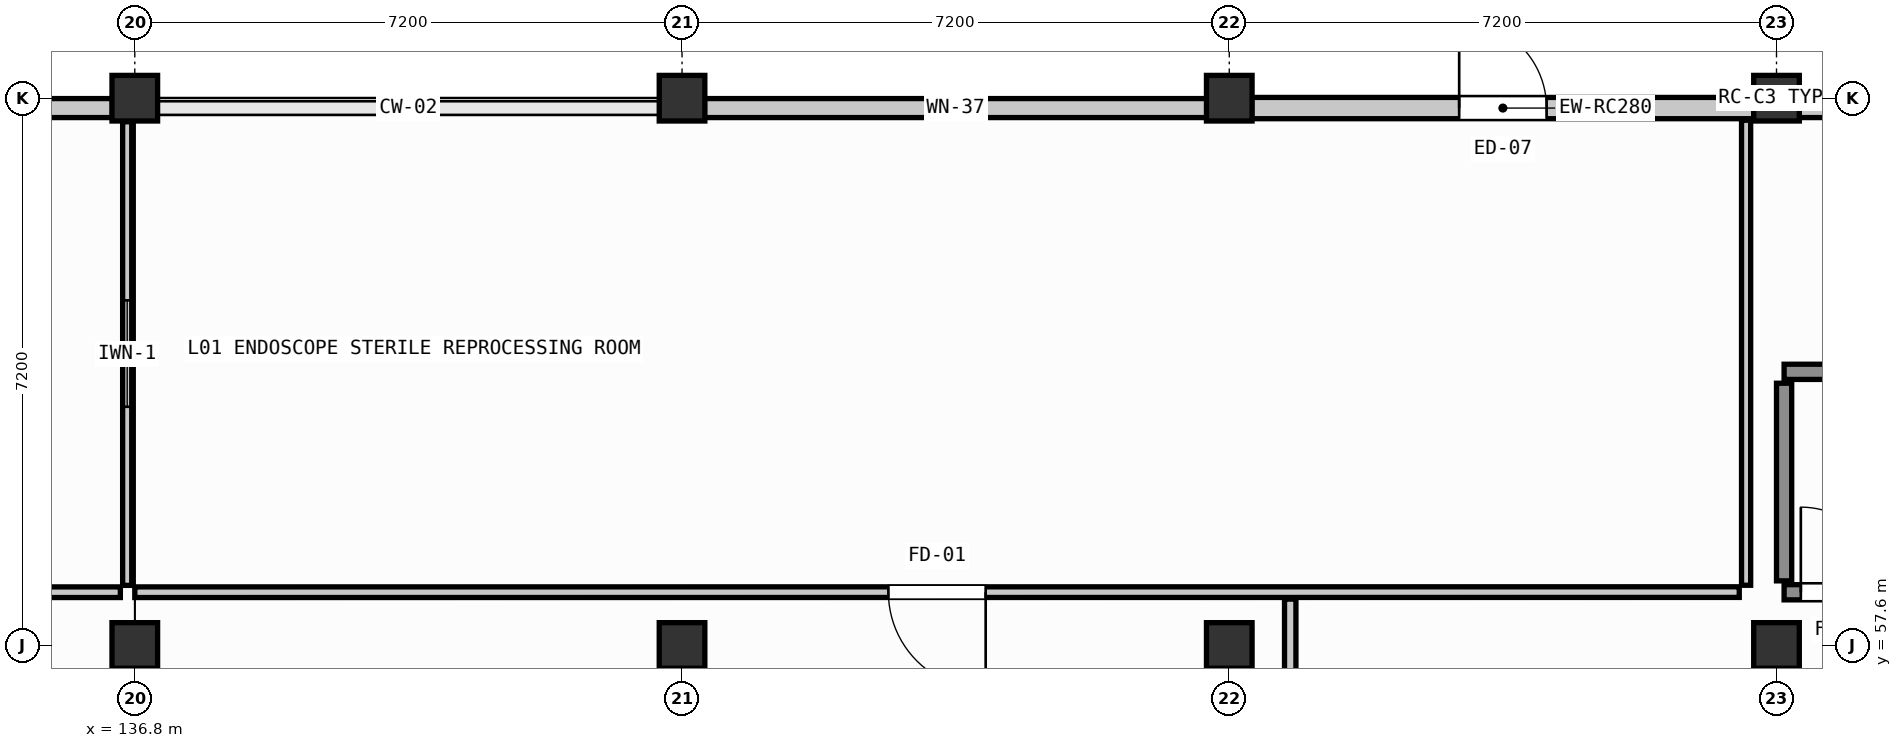
"""IFC4 building model, lengths in metres.
Left out: names, types, materials, properties, quantities, classifications, styles, units other than length and angle.
Written with IfcOpenShell. Run it as: python <this file> out.ifc"""

import sys

from ifc_helpers import new_model, si_unit, direction, frame, frame_2d, origin, origin_2d, place, context, subcontext, project, spatial, rectangle, extrude, element, fill, save


model = new_model("IFC4")
c1 = context("Model", 3, precision=1e-05, world=origin(), true_north=direction((0.0, 1.0)))
c2 = subcontext(c1, "Body", "Model", "MODEL_VIEW")
j1 = project(units=[si_unit("LENGTHUNIT", "METRE"), si_unit("PLANEANGLEUNIT", "RADIAN")], contexts=[c1])
p1 = place(None, origin())
s1 = spatial("IfcSite", under=j1, at=p1, CompositionType="ELEMENT")
p2 = place(p1, origin())
s2 = spatial("IfcBuilding", under=s1, at=p2, CompositionType="ELEMENT")
p3 = place(p2, origin())
s3 = spatial("IfcBuildingStorey", under=s2, at=p3, CompositionType="ELEMENT", Elevation=0.0)
for number, where, z_axis, x_axis in (
    (1, (136.8, 57.6, -0.25), (0.0, 0.0, 1.0), (1.0, 0.0, 0.0)),
    (2, (136.8, 64.8, -0.25), (0.0, 0.0, 1.0), (1.0, 0.0, 0.0)),
    (3, (144.0, 57.6, -0.25), (0.0, 0.0, 1.0), (1.0, 0.0, 0.0)),
    (4, (144.0, 64.8, -0.25), (0.0, 0.0, 1.0), (1.0, 0.0, 0.0)),
    (5, (151.2, 57.6, -0.25), (0.0, 0.0, 1.0), (1.0, 0.0, 0.0)),
    (6, (151.2, 64.8, -0.25), (0.0, 0.0, 1.0), (1.0, 0.0, 0.0)),
    (7, (158.4, 57.6, -0.25), (0.0, 0.0, 1.0), (1.0, 0.0, 0.0)),
    (8, (158.4, 64.8, -0.25), (0.0, 0.0, 1.0), (1.0, 0.0, 0.0)),
):
    element("IfcColumn", number, at=place(p3, frame(where, z_axis=z_axis, x_axis=x_axis)), inside=s3, PredefinedType="COLUMN", context=c2, shape_type="SweptSolid", body=[
        extrude(rectangle(XDim=0.6, YDim=0.6, at=origin_2d()), origin(), (0.0, 0.0, 1.0), 4.81),
    ])
p4 = place(p3, frame((129.895, 64.67, 0.0), z_axis=(0.0, 0.0, 1.0), x_axis=(1.0, 0.0, 0.0)))
e9 = element("IfcWall", 9, at=p4, inside=s3, PredefinedType="SOLIDWALL", context=c2, shape_type="SweptSolid", body=[
    extrude(rectangle(XDim=6.61, YDim=0.25, at=frame_2d((3.305, 0.0))), origin(), (0.0, 0.0, 1.0), 3.76),
])
p5 = place(p4, frame((2.105, 0.0, 0.95)))
e10 = element("IfcOpeningElement", 10, at=p5, cuts=e9, PredefinedType="OPENING", context=c2, shape_type="SweptSolid", body=[
    extrude(rectangle(XDim=2.4, YDim=1.25, at=frame_2d((1.2, 0.625))), frame((0.0, 0.135, 0.0), z_axis=(0.0, -1.0, 0.0), x_axis=(1.0, 0.0, 0.0)), (0.0, 0.0, 1.0), 0.27),
])
p6 = place(p3, frame((144.295, 64.67, 0.0), z_axis=(0.0, 0.0, 1.0), x_axis=(1.0, 0.0, 0.0)))
e11 = element("IfcWall", 11, at=p6, inside=s3, PredefinedType="SOLIDWALL", context=c2, shape_type="SweptSolid", body=[
    extrude(rectangle(XDim=6.61, YDim=0.25, at=frame_2d((3.305, 0.0))), origin(), (0.0, 0.0, 1.0), 3.76),
])
p7 = place(p6, frame((2.93, 0.0, 0.95)))
e12 = element("IfcOpeningElement", 12, at=p7, cuts=e11, PredefinedType="OPENING", context=c2, shape_type="SweptSolid", body=[
    extrude(rectangle(XDim=0.75, YDim=1.55, at=frame_2d((0.375, 0.775))), frame((0.0, 0.135, 0.0), z_axis=(0.0, -1.0, 0.0), x_axis=(1.0, 0.0, 0.0)), (0.0, 0.0, 1.0), 0.27),
])
p8 = place(p3, frame((151.495, 64.67, 0.0), z_axis=(0.0, 0.0, 1.0), x_axis=(1.0, 0.0, 0.0)))
e13 = element("IfcWall", 13, at=p8, inside=s3, PredefinedType="SOLIDWALL", context=c2, shape_type="SweptSolid", body=[
    extrude(rectangle(XDim=6.61, YDim=0.28, at=frame_2d((3.305, 0.0))), origin(), (0.0, 0.0, 1.0), 3.76),
])
p9 = place(p8, frame((2.73, 0.0, 0.0)))
e14 = element("IfcOpeningElement", 14, at=p9, cuts=e13, PredefinedType="OPENING", context=c2, shape_type="SweptSolid", body=[
    extrude(rectangle(XDim=1.15, YDim=2.15, at=frame_2d((0.575, 1.075))), frame((0.0, 0.15, 0.0), z_axis=(0.0, -1.0, 0.0), x_axis=(1.0, 0.0, 0.0)), (0.0, 0.0, 1.0), 0.3),
])
p10 = place(p3, frame((158.695, 64.67, 0.0), z_axis=(0.0, 0.0, 1.0), x_axis=(1.0, 0.0, 0.0)))
e15 = element("IfcWall", 15, at=p10, inside=s3, PredefinedType="SOLIDWALL", context=c2, shape_type="SweptSolid", body=[
    extrude(rectangle(XDim=6.61, YDim=0.25, at=frame_2d((3.305, 0.0))), origin(), (0.0, 0.0, 1.0), 3.76),
])
p11 = place(p10, frame((2.855, 0.0, 0.95)))
e16 = element("IfcOpeningElement", 16, at=p11, cuts=e15, PredefinedType="OPENING", context=c2, shape_type="SweptSolid", body=[
    extrude(rectangle(XDim=0.9, YDim=1.55, at=frame_2d((0.45, 0.775))), frame((0.0, 0.135, 0.0), z_axis=(0.0, -1.0, 0.0), x_axis=(1.0, 0.0, 0.0)), (0.0, 0.0, 1.0), 0.27),
])
p12 = place(p3, frame((158.5, 58.3, -0.25), z_axis=(0.0, 0.0, 1.0), x_axis=(1.0, 0.0, 0.0)))
e17 = element("IfcWall", 17, at=p12, inside=s3, PredefinedType="SHEAR", context=c2, shape_type="SweptSolid", body=[
    extrude(rectangle(XDim=6.775, YDim=0.2, at=frame_2d((3.387, 0.0))), origin(), (0.0, 0.0, 1.0), 5.05),
])
p13 = place(p12, frame((0.22, 0.0, 0.25)))
e18 = element("IfcOpeningElement", 18, at=p13, cuts=e17, PredefinedType="OPENING", context=c2, shape_type="SweptSolid", body=[
    extrude(rectangle(XDim=1.12, YDim=2.14, at=frame_2d((0.56, 1.07))), frame((0.0, 0.11, 0.0), z_axis=(0.0, -1.0, 0.0), x_axis=(1.0, 0.0, 0.0)), (0.0, 0.0, 1.0), 0.22),
])
p14 = place(p3, frame((158.5, 61.2, -0.25), z_axis=(0.0, 0.0, 1.0), x_axis=(1.0, 0.0, 0.0)))
e19 = element("IfcWall", 19, at=p14, inside=s3, PredefinedType="SHEAR", context=c2, shape_type="SweptSolid", body=[
    extrude(rectangle(XDim=6.775, YDim=0.2, at=frame_2d((3.387, 0.0))), origin(), (0.0, 0.0, 1.0), 5.05),
])
p15 = place(p3, frame((158.5, 58.45, -0.25), z_axis=(0.0, 0.0, 1.0), x_axis=(0.0, 1.0, 0.0)))
e20 = element("IfcWall", 20, at=p15, inside=s3, PredefinedType="SHEAR", context=c2, shape_type="SweptSolid", body=[
    extrude(rectangle(XDim=2.6, YDim=0.2, at=frame_2d((1.3, 0.0))), origin(), (0.0, 0.0, 1.0), 5.05),
])
p16 = place(p3, frame((152.002, 54.49, 0.0), z_axis=(0.0, 0.0, 1.0), x_axis=(0.0, 1.0, 0.0)))
e21 = element("IfcWall", 21, at=p16, inside=s3, PredefinedType="PARTITIONING", context=c2, shape_type="SweptSolid", body=[
    extrude(rectangle(XDim=3.72, YDim=0.15, at=frame_2d((1.86, 0.0))), origin(), (0.0, 0.0, 1.0), 3.76),
])
p17 = place(p16, frame((0.32, 0.0, 0.0)))
e22 = element("IfcOpeningElement", 22, at=p17, cuts=e21, PredefinedType="OPENING", context=c2, shape_type="SweptSolid", body=[
    extrude(rectangle(XDim=1.28, YDim=2.18, at=frame_2d((0.64, 1.09))), frame((0.0, 0.085, 0.0), z_axis=(0.0, -1.0, 0.0), x_axis=(1.0, 0.0, 0.0)), (0.0, 0.0, 1.0), 0.17),
])
p18 = place(p3, frame((136.7, 64.49, 0.0), z_axis=(0.0, 0.0, 1.0), x_axis=(0.0, -1.0, 0.0)))
e23 = element("IfcWall", 23, at=p18, inside=s3, PredefinedType="PARTITIONING", context=c2, shape_type="SweptSolid", body=[
    extrude(rectangle(XDim=6.1, YDim=0.12, at=frame_2d((3.05, 0.0))), origin(), (0.0, 0.0, 1.0), 3.76),
])
p19 = place(p18, frame((2.35, 0.0, 1.15)))
e24 = element("IfcOpeningElement", 24, at=p19, cuts=e23, PredefinedType="OPENING", context=c2, shape_type="SweptSolid", body=[
    extrude(rectangle(XDim=1.4, YDim=1.05, at=frame_2d((0.7, 0.525))), frame((0.0, 0.07, 0.0), z_axis=(0.0, -1.0, 0.0), x_axis=(1.0, 0.0, 0.0)), (0.0, 0.0, 1.0), 0.14),
])
p20 = place(p3, frame((136.61, 58.301, 0.0), z_axis=(0.0, 0.0, 1.0), x_axis=(-0.999999994495, -0.000104930876, 0.0)))
e25 = element("IfcWall", 25, at=p20, inside=s3, PredefinedType="PARTITIONING", context=c2, shape_type="SweptSolid", body=[
    extrude(rectangle(XDim=27.92, YDim=0.14, at=frame_2d((13.96, 0.0))), origin(), (0.0, 0.0, 1.0), 3.86),
])
p21 = place(p20, frame((11.52, 0.0, 0.0)))
e26 = element("IfcOpeningElement", 26, at=p21, cuts=e25, PredefinedType="OPENING", context=c2, shape_type="SweptSolid", body=[
    extrude(rectangle(XDim=1.28, YDim=2.18, at=frame_2d((0.64, 1.09))), frame((0.0, 0.08, 0.0), z_axis=(0.0, -1.0, 0.0), x_axis=(1.0, 0.0, 0.0)), (0.0, 0.0, 1.0), 0.16),
])
p22 = place(p3, frame((158.0, 64.51, 0.0), z_axis=(0.0, 0.0, 1.0), x_axis=(0.0, -1.0, 0.0)))
e27 = element("IfcWall", 27, at=p22, inside=s3, PredefinedType="PARTITIONING", context=c2, shape_type="SweptSolid", body=[
    extrude(rectangle(XDim=6.118, YDim=0.12, at=frame_2d((3.059, 0.0))), origin(), (0.0, 0.0, 1.0), 3.76),
])
p23 = place(p3, frame((157.91, 58.302, 0.0), z_axis=(0.0, 0.0, 1.0), x_axis=(-0.999999997592, -6.9391437e-05, 0.0)))
e28 = element("IfcWall", 28, at=p23, inside=s3, PredefinedType="PARTITIONING", context=c2, shape_type="SweptSolid", body=[
    extrude(rectangle(XDim=21.11, YDim=0.14, at=frame_2d((10.555, 0.0))), origin(), (0.0, 0.0, 1.0), 3.86),
])
p24 = place(p23, frame((9.915, 0.0, 0.0)))
e29 = element("IfcOpeningElement", 29, at=p24, cuts=e28, PredefinedType="OPENING", context=c2, shape_type="SweptSolid", body=[
    extrude(rectangle(XDim=1.28, YDim=2.18, at=frame_2d((0.64, 1.09))), frame((0.0, 0.08, 0.0), z_axis=(0.0, -1.0, 0.0), x_axis=(1.0, 0.0, 0.0)), (0.0, 0.0, 1.0), 0.16),
])
p25 = place(p7, origin())
e30 = element("IfcWindow", 30, at=p25, inside=s3, PartitioningType="SINGLE_PANEL", PredefinedType="WINDOW", context=c2, shape_type="SweptSolid", body=[
    extrude(rectangle(XDim=0.75, YDim=1.55, at=frame_2d((0.375, 0.775))), frame((0.0, 0.03, 0.0), z_axis=(0.0, -1.0, 0.0), x_axis=(1.0, 0.0, 0.0)), (0.0, 0.0, 1.0), 0.06),
])
fill(e12, e30)
p26 = place(p9, origin())
e31 = element("IfcDoor", 31, at=p26, inside=s3, OperationType="SINGLE_SWING_RIGHT", PredefinedType="DOOR", context=c2, shape_type="SweptSolid", body=[
    extrude(rectangle(XDim=1.15, YDim=2.15, at=frame_2d((0.575, 1.075))), frame((0.0, 0.025, 0.0), z_axis=(0.0, -1.0, 0.0), x_axis=(1.0, 0.0, 0.0)), (0.0, 0.0, 1.0), 0.05),
])
fill(e14, e31)
p27 = place(p13, origin())
e32 = element("IfcDoor", 32, at=p27, inside=s3, OperationType="SINGLE_SWING_LEFT", PredefinedType="DOOR", context=c2, shape_type="SweptSolid", body=[
    extrude(rectangle(XDim=1.12, YDim=2.14, at=frame_2d((0.56, 1.07))), frame((0.0, 0.025, 0.0), z_axis=(0.0, -1.0, 0.0), x_axis=(1.0, 0.0, 0.0)), (0.0, 0.0, 1.0), 0.05),
])
fill(e18, e32)
p28 = place(p19, origin())
e33 = element("IfcWindow", 33, at=p28, inside=s3, PartitioningType="SINGLE_PANEL", PredefinedType="WINDOW", context=c2, shape_type="SweptSolid", body=[
    extrude(rectangle(XDim=1.4, YDim=1.05, at=frame_2d((0.7, 0.525))), frame((0.0, 0.03, 0.0), z_axis=(0.0, -1.0, 0.0), x_axis=(1.0, 0.0, 0.0)), (0.0, 0.0, 1.0), 0.06),
])
fill(e24, e33)
p29 = place(p24, origin())
e34 = element("IfcDoor", 34, at=p29, inside=s3, OperationType="SINGLE_SWING_RIGHT", PredefinedType="DOOR", context=c2, shape_type="SweptSolid", body=[
    extrude(rectangle(XDim=1.28, YDim=2.18, at=frame_2d((0.64, 1.09))), frame((0.0, 0.025, 0.0), z_axis=(0.0, -1.0, 0.0), x_axis=(1.0, 0.0, 0.0)), (0.0, 0.0, 1.0), 0.05),
])
fill(e29, e34)
save(model, sys.argv[1])
